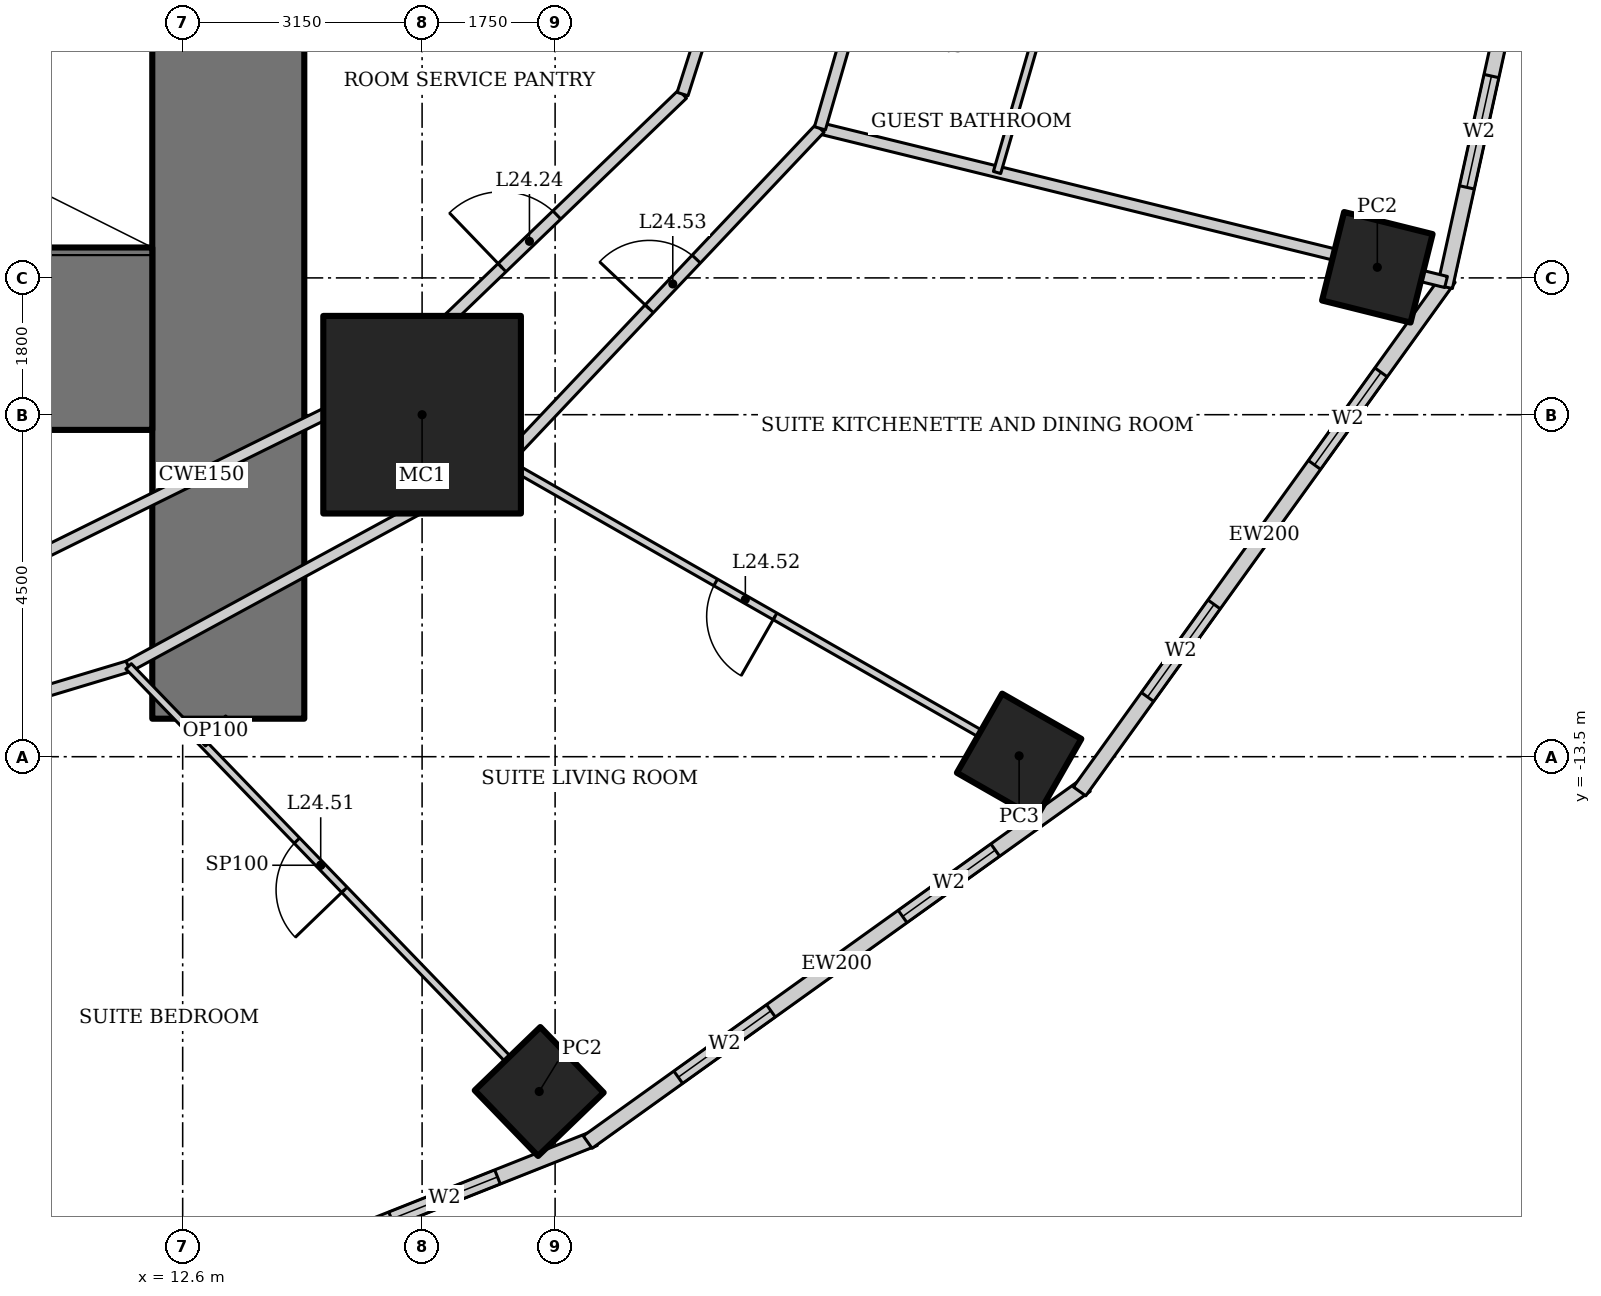
"""IFC4 building model, lengths in metres.
Left out: names, types, materials, properties, quantities, classifications, styles, units other than length and angle.
Written with IfcOpenShell. Run it as: python <this file> out.ifc"""

import sys

from ifc_helpers import new_model, si_unit, direction, frame, frame_2d, origin, origin_2d, place, context, subcontext, project, spatial, rectangle, hollow_rectangle, extrude, element, fill, save


model = new_model("IFC4")
c1 = context("Model", 3, precision=1e-05, world=origin(), true_north=direction((0.0, 1.0)))
c2 = subcontext(c1, "Body", "Model", "MODEL_VIEW")
j1 = project(units=[si_unit("LENGTHUNIT", "METRE"), si_unit("PLANEANGLEUNIT", "RADIAN")], contexts=[c1])
p1 = place(None, origin())
s1 = spatial("IfcSite", under=j1, at=p1, CompositionType="ELEMENT")
p2 = place(p1, origin())
s2 = spatial("IfcBuilding", under=s1, at=p2, CompositionType="ELEMENT")
p3 = place(p2, frame((0.0, 0.0, 101.8)))
s3 = spatial("IfcBuildingStorey", under=s2, at=p3, CompositionType="ELEMENT", Elevation=101.8)
p4 = place(p3, frame((15.75, -9.0, 0.0), z_axis=(0.0, 0.0, 1.0), x_axis=(1.0, 0.0, 0.0)))
e1 = element("IfcColumn", 1, at=p4, inside=s3, PredefinedType="COLUMN", context=c2, shape_type="SweptSolid", body=[
    extrude(hollow_rectangle(XDim=2.6, YDim=2.6, WallThickness=0.13, at=origin_2d()), origin(), (0.0, 0.0, 1.0), 3.6),
])
p5 = place(p3, frame((17.291, -17.905, 0.0), z_axis=(0.0, 0.0, 1.0), x_axis=(0.719339800339, 0.694658370459, 0.0)))
e2 = element("IfcColumn", 2, at=p5, inside=s3, PredefinedType="COLUMN", context=c2, shape_type="SweptSolid", body=[
    extrude(hollow_rectangle(XDim=1.2, YDim=1.2, WallThickness=0.1, at=origin_2d()), origin(), (0.0, 0.0, 1.0), 2.28),
])
p6 = place(p3, frame((23.605, -13.489, 0.0), z_axis=(0.0, 0.0, 1.0), x_axis=(0.496139221777, 0.86824298017, 0.0)))
e3 = element("IfcColumn", 3, at=p6, inside=s3, PredefinedType="COLUMN", context=c2, shape_type="SweptSolid", body=[
    extrude(hollow_rectangle(XDim=1.2, YDim=1.2, WallThickness=0.12, at=origin_2d()), origin(), (0.0, 0.0, 1.0), 2.28),
])
p7 = place(p3, frame((28.318, -7.06, 0.0), z_axis=(0.0, 0.0, 1.0), x_axis=(0.2419218956, 0.970295726276, 0.0)))
e4 = element("IfcColumn", 4, at=p7, inside=s3, PredefinedType="COLUMN", context=c2, shape_type="SweptSolid", body=[
    extrude(hollow_rectangle(XDim=1.2, YDim=1.2, WallThickness=0.1, at=origin_2d()), origin(), (0.0, 0.0, 1.0), 2.28),
])
p8 = place(p3, frame((13.2, -13.0, 0.0), z_axis=(0.0, 0.0, 1.0), x_axis=(0.0, 1.0, 0.0)))
e5 = element("IfcWall", 5, at=p8, inside=s3, PredefinedType="SHEAR", context=c2, shape_type="SweptSolid", body=[
    extrude(rectangle(XDim=26.0, YDim=2.0, at=frame_2d((13.0, 0.0))), origin(), (0.0, 0.0, 1.0), 3.6),
])
p9 = place(p8, frame((12.1, 0.0, 0.0)))
e6 = element("IfcOpeningElement", 6, at=p9, cuts=e5, PredefinedType="OPENING", context=c2, shape_type="SweptSolid", body=[
    extrude(rectangle(XDim=1.8, YDim=2.1, at=frame_2d((0.9, 1.05))), frame((0.0, 1.01, 0.0), z_axis=(0.0, -1.0, 0.0), x_axis=(1.0, 0.0, 0.0)), (0.0, 0.0, 1.0), 2.02),
])
p10 = place(p3, frame((-12.2, -8.0, 0.0), z_axis=(0.0, 0.0, 1.0), x_axis=(1.0, 0.0, 0.0)))
e7 = element("IfcWall", 7, at=p10, inside=s3, PredefinedType="SHEAR", context=c2, shape_type="SweptSolid", body=[
    extrude(rectangle(XDim=24.4, YDim=2.4, at=frame_2d((12.2, 0.0))), origin(), (0.0, 0.0, 1.0), 3.6),
])
p11 = place(p3, frame((10.869, -21.363, 0.0), z_axis=(0.0, 0.0, 1.0), x_axis=(0.929358351251, 0.369178892895, 0.0)))
e8 = element("IfcWall", 8, at=p11, inside=s3, PredefinedType="SOLIDWALL", context=c2, shape_type="SweptSolid", body=[
    extrude(rectangle(XDim=7.692, YDim=0.2, at=frame_2d((3.846, 0.0))), origin(), (0.0, 0.0, 1.0), 3.4),
])
p12 = place(p11, frame((1.373, 0.0, 0.5)))
e9 = element("IfcOpeningElement", 9, at=p12, cuts=e8, PredefinedType="OPENING", context=c2, shape_type="SweptSolid", body=[
    extrude(rectangle(XDim=1.5, YDim=2.2, at=frame_2d((0.75, 1.1))), frame((0.0, 0.11, 0.0), z_axis=(0.0, -1.0, 0.0), x_axis=(1.0, 0.0, 0.0)), (0.0, 0.0, 1.0), 0.22),
])
p13 = place(p11, frame((4.819, 0.0, 0.5)))
e10 = element("IfcOpeningElement", 10, at=p13, cuts=e8, PredefinedType="OPENING", context=c2, shape_type="SweptSolid", body=[
    extrude(rectangle(XDim=1.5, YDim=2.2, at=frame_2d((0.75, 1.1))), frame((0.0, 0.11, 0.0), z_axis=(0.0, -1.0, 0.0), x_axis=(1.0, 0.0, 0.0)), (0.0, 0.0, 1.0), 0.22),
])
p14 = place(p3, frame((17.929, -18.572, 0.0), z_axis=(0.0, 0.0, 1.0), x_axis=(0.812791321576, 0.582554948112, 0.0)))
e11 = element("IfcWall", 11, at=p14, inside=s3, PredefinedType="SOLIDWALL", context=c2, shape_type="SweptSolid", body=[
    extrude(rectangle(XDim=8.063, YDim=0.2, at=frame_2d((4.032, 0.0))), origin(), (0.0, 0.0, 1.0), 3.4),
])
p15 = place(p14, frame((1.466, 0.0, 0.5)))
e12 = element("IfcOpeningElement", 12, at=p15, cuts=e11, PredefinedType="OPENING", context=c2, shape_type="SweptSolid", body=[
    extrude(rectangle(XDim=1.5, YDim=2.2, at=frame_2d((0.75, 1.1))), frame((0.0, 0.11, 0.0), z_axis=(0.0, -1.0, 0.0), x_axis=(1.0, 0.0, 0.0)), (0.0, 0.0, 1.0), 0.22),
])
p16 = place(p14, frame((5.097, 0.0, 0.5)))
e13 = element("IfcOpeningElement", 13, at=p16, cuts=e11, PredefinedType="OPENING", context=c2, shape_type="SweptSolid", body=[
    extrude(rectangle(XDim=1.5, YDim=2.2, at=frame_2d((0.75, 1.1))), frame((0.0, 0.11, 0.0), z_axis=(0.0, -1.0, 0.0), x_axis=(1.0, 0.0, 0.0)), (0.0, 0.0, 1.0), 0.22),
])
p17 = place(p3, frame((24.4, -13.957, 0.0), z_axis=(0.0, 0.0, 1.0), x_axis=(0.583937613703, 0.811798536155, 0.0)))
e14 = element("IfcWall", 14, at=p17, inside=s3, PredefinedType="SOLIDWALL", context=c2, shape_type="SweptSolid", body=[
    extrude(rectangle(XDim=8.323, YDim=0.2, at=frame_2d((4.162, 0.0))), origin(), (0.0, 0.0, 1.0), 3.4),
])
p18 = place(p17, frame((1.531, 0.0, 0.5)))
e15 = element("IfcOpeningElement", 15, at=p18, cuts=e14, PredefinedType="OPENING", context=c2, shape_type="SweptSolid", body=[
    extrude(rectangle(XDim=1.5, YDim=2.2, at=frame_2d((0.75, 1.1))), frame((0.0, 0.11, 0.0), z_axis=(0.0, -1.0, 0.0), x_axis=(1.0, 0.0, 0.0)), (0.0, 0.0, 1.0), 0.22),
])
p19 = place(p17, frame((5.292, 0.0, 0.5)))
e16 = element("IfcOpeningElement", 16, at=p19, cuts=e14, PredefinedType="OPENING", context=c2, shape_type="SweptSolid", body=[
    extrude(rectangle(XDim=1.5, YDim=2.2, at=frame_2d((0.75, 1.1))), frame((0.0, 0.11, 0.0), z_axis=(0.0, -1.0, 0.0), x_axis=(1.0, 0.0, 0.0)), (0.0, 0.0, 1.0), 0.22),
])
p20 = place(p3, frame((29.208, -7.318, 0.0), z_axis=(0.0, 0.0, 1.0), x_axis=(0.215238065514, 0.976561608478, 0.0)))
e17 = element("IfcWall", 17, at=p20, inside=s3, PredefinedType="SOLIDWALL", context=c2, shape_type="SweptSolid", body=[
    extrude(rectangle(XDim=7.562, YDim=0.2, at=frame_2d((3.781, 0.0))), origin(), (0.0, 0.0, 1.0), 3.4),
])
p21 = place(p20, frame((1.341, 0.0, 0.5)))
e18 = element("IfcOpeningElement", 18, at=p21, cuts=e17, PredefinedType="OPENING", context=c2, shape_type="SweptSolid", body=[
    extrude(rectangle(XDim=1.5, YDim=2.2, at=frame_2d((0.75, 1.1))), frame((0.0, 0.11, 0.0), z_axis=(0.0, -1.0, 0.0), x_axis=(1.0, 0.0, 0.0)), (0.0, 0.0, 1.0), 0.22),
])
p22 = place(p20, frame((4.722, 0.0, 0.5)))
e19 = element("IfcOpeningElement", 19, at=p22, cuts=e17, PredefinedType="OPENING", context=c2, shape_type="SweptSolid", body=[
    extrude(rectangle(XDim=1.5, YDim=2.2, at=frame_2d((0.75, 1.1))), frame((0.0, 0.11, 0.0), z_axis=(0.0, -1.0, 0.0), x_axis=(1.0, 0.0, 0.0)), (0.0, 0.0, 1.0), 0.22),
])
p23 = place(p3, frame((10.912, -21.346, 0.0), z_axis=(0.0, 0.0, 1.0), x_axis=(-0.457327273085, 0.889298468059, 0.0)))
e20 = element("IfcWall", 20, at=p23, inside=s3, PredefinedType="PARTITIONING", context=c2, shape_type="SweptSolid", body=[
    extrude(rectangle(XDim=8.511, YDim=0.15, at=frame_2d((4.256, 0.0))), origin(), (0.0, 0.0, 1.0), 2.463),
])
p24 = place(p3, frame((29.222, -7.254, 0.0), z_axis=(0.0, 0.0, 1.0), x_axis=(-0.971178166182, 0.238354713676, 0.0)))
e21 = element("IfcWall", 21, at=p24, inside=s3, PredefinedType="PARTITIONING", context=c2, shape_type="SweptSolid", body=[
    extrude(rectangle(XDim=8.482, YDim=0.15, at=frame_2d((4.241, 0.0))), origin(), (0.0, 0.0, 1.0), 1.9),
])
p25 = place(p3, frame((7.019, -13.776, 0.0), z_axis=(0.0, 0.0, 1.0), x_axis=(0.957564241242, 0.288219922793, 0.0)))
e22 = element("IfcWall", 22, at=p25, inside=s3, PredefinedType="PARTITIONING", context=c2, shape_type="SweptSolid", body=[
    extrude(rectangle(XDim=5.085, YDim=0.15, at=frame_2d((2.542, 0.0))), origin(), (0.0, 0.0, 1.0), 3.4),
])
p26 = place(p3, frame((11.888, -12.311, 0.0), z_axis=(0.0, 0.0, 1.0), x_axis=(0.878450059298, 0.477834169267, 0.0)))
e23 = element("IfcWall", 23, at=p26, inside=s3, PredefinedType="PARTITIONING", context=c2, shape_type="SweptSolid", body=[
    extrude(rectangle(XDim=5.631, YDim=0.15, at=frame_2d((2.815, 0.0))), origin(), (0.0, 0.0, 1.0), 3.4),
])
p27 = place(p3, frame((16.835, -9.62, 0.0), z_axis=(0.0, 0.0, 1.0), x_axis=(0.687062608696, 0.726598218916, 0.0)))
e24 = element("IfcWall", 24, at=p27, inside=s3, PredefinedType="PARTITIONING", context=c2, shape_type="SweptSolid", body=[
    extrude(rectangle(XDim=6.039, YDim=0.15, at=frame_2d((3.02, 0.0))), origin(), (0.0, 0.0, 1.0), 3.4),
])
p28 = place(p27, frame((2.771, 0.0, 0.0)))
e25 = element("IfcOpeningElement", 25, at=p28, cuts=e24, PredefinedType="OPENING", context=c2, shape_type="SweptSolid", body=[
    extrude(rectangle(XDim=0.9, YDim=2.1, at=frame_2d((0.45, 1.05))), frame((0.0, 0.085, 0.0), z_axis=(0.0, -1.0, 0.0), x_axis=(1.0, 0.0, 0.0)), (0.0, 0.0, 1.0), 0.17),
])
p29 = place(p3, frame((20.984, -5.232, 0.0), z_axis=(0.0, 0.0, 1.0), x_axis=(0.278247435376, 0.960509429785, 0.0)))
e26 = element("IfcWall", 26, at=p29, inside=s3, PredefinedType="PARTITIONING", context=c2, shape_type="SweptSolid", body=[
    extrude(rectangle(XDim=5.447, YDim=0.15, at=frame_2d((2.724, 0.0))), origin(), (0.0, 0.0, 1.0), 3.4),
])
p30 = place(p29, frame((4.397, 0.0, 0.0)))
e27 = element("IfcOpeningElement", 27, at=p30, cuts=e26, PredefinedType="OPENING", context=c2, shape_type="SweptSolid", body=[
    extrude(rectangle(XDim=0.9, YDim=2.1, at=frame_2d((0.45, 1.05))), frame((0.0, 0.085, 0.0), z_axis=(0.0, -1.0, 0.0), x_axis=(1.0, 0.0, 0.0)), (0.0, 0.0, 1.0), 0.17),
])
p31 = place(p3, frame((10.551, -10.926, 0.0), z_axis=(0.0, 0.0, 1.0), x_axis=(0.89656943448, 0.442903205177, 0.0)))
e28 = element("IfcWall", 28, at=p31, inside=s3, PredefinedType="PARTITIONING", context=c2, shape_type="SweptSolid", body=[
    extrude(rectangle(XDim=5.126, YDim=0.15, at=frame_2d((2.563, 0.0))), origin(), (0.0, 0.0, 1.0), 3.4),
])
p32 = place(p3, frame((15.147, -8.656, 0.0), z_axis=(0.0, 0.0, 1.0), x_axis=(0.720837261072, 0.693104352209, 0.0)))
e29 = element("IfcWall", 29, at=p32, inside=s3, PredefinedType="PARTITIONING", context=c2, shape_type="SweptSolid", body=[
    extrude(rectangle(XDim=5.59, YDim=0.15, at=frame_2d((2.795, 0.0))), origin(), (0.0, 0.0, 1.0), 3.4),
])
p33 = place(p32, frame((2.295, 0.0, 0.0)))
e30 = element("IfcOpeningElement", 30, at=p33, cuts=e29, PredefinedType="OPENING", context=c2, shape_type="SweptSolid", body=[
    extrude(rectangle(XDim=1.0, YDim=2.1, at=frame_2d((0.5, 1.05))), frame((0.0, 0.085, 0.0), z_axis=(0.0, -1.0, 0.0), x_axis=(1.0, 0.0, 0.0)), (0.0, 0.0, 1.0), 0.17),
])
p34 = place(p3, frame((19.177, -4.781, 0.0), z_axis=(0.0, 0.0, 1.0), x_axis=(0.303505448228, 0.952829702988, 0.0)))
e31 = element("IfcWall", 31, at=p34, inside=s3, PredefinedType="PARTITIONING", context=c2, shape_type="SweptSolid", body=[
    extrude(rectangle(XDim=4.073, YDim=0.15, at=frame_2d((2.037, 0.0))), origin(), (0.0, 0.0, 1.0), 3.4),
])
p35 = place(p3, frame((16.944, -17.545, 0.0), z_axis=(0.0, 0.0, 1.0), x_axis=(-0.694669949151, 0.719328618746, 0.0)))
e32 = element("IfcWall", 32, at=p35, inside=s3, PredefinedType="PARTITIONING", context=c2, shape_type="SweptSolid", body=[
    extrude(rectangle(XDim=7.277, YDim=0.1, at=frame_2d((3.639, 0.0))), origin(), (0.0, 0.0, 1.0), 2.463),
])
p36 = place(p35, frame((3.189, 0.0, 0.0)))
e33 = element("IfcOpeningElement", 33, at=p36, cuts=e32, PredefinedType="OPENING", context=c2, shape_type="SweptSolid", body=[
    extrude(rectangle(XDim=0.9, YDim=2.1, at=frame_2d((0.45, 1.05))), frame((0.0, 0.06, 0.0), z_axis=(0.0, -1.0, 0.0), x_axis=(1.0, 0.0, 0.0)), (0.0, 0.0, 1.0), 0.12),
])
p37 = place(p3, frame((23.171, -13.24, 0.0), z_axis=(0.0, 0.0, 1.0), x_axis=(-0.868253436131, 0.496120923412, 0.0)))
e34 = element("IfcWall", 34, at=p37, inside=s3, PredefinedType="PARTITIONING", context=c2, shape_type="SweptSolid", body=[
    extrude(rectangle(XDim=7.297, YDim=0.1, at=frame_2d((3.649, 0.0))), origin(), (0.0, 0.0, 1.0), 2.2),
])
p38 = place(p37, frame((3.198, 0.0, 0.0)))
e35 = element("IfcOpeningElement", 35, at=p38, cuts=e34, PredefinedType="OPENING", context=c2, shape_type="SweptSolid", body=[
    extrude(rectangle(XDim=0.9, YDim=2.1, at=frame_2d((0.45, 1.05))), frame((0.0, 0.06, 0.0), z_axis=(0.0, -1.0, 0.0), x_axis=(1.0, 0.0, 0.0)), (0.0, 0.0, 1.0), 0.12),
])
p39 = place(p3, frame((23.846, -3.979, 0.0), z_axis=(0.0, 0.0, 1.0), x_axis=(-0.278197767203, -0.960523816635, 0.0)))
e36 = element("IfcWall", 36, at=p39, inside=s3, PredefinedType="PARTITIONING", context=c2, shape_type="SweptSolid", body=[
    extrude(rectangle(XDim=1.91, YDim=0.1, at=frame_2d((0.955, 0.0))), origin(), (0.0, 0.0, 1.0), 3.4),
])
p40 = place(p3, frame((13.2, -13.0, 0.0), z_axis=(0.0, 0.0, 1.0), x_axis=(-0.719347134512, -0.69465077562, 0.0)))
e37 = element("IfcWall", 37, at=p40, inside=s3, PredefinedType="PARTITIONING", context=c2, shape_type="SweptSolid", body=[
    extrude(rectangle(XDim=0.465, YDim=0.1, at=frame_2d((0.232, 0.0))), origin(), (0.0, 0.0, 1.0), 3.4),
])
p41 = place(p13, origin())
e38 = element("IfcWindow", 38, at=p41, inside=s3, PartitioningType="SINGLE_PANEL", PredefinedType="WINDOW", context=c2, shape_type="SweptSolid", body=[
    extrude(rectangle(XDim=1.5, YDim=2.2, at=frame_2d((0.75, 1.1))), frame((0.0, 0.03, 0.0), z_axis=(0.0, -1.0, 0.0), x_axis=(1.0, 0.0, 0.0)), (0.0, 0.0, 1.0), 0.06),
])
fill(e10, e38)
p42 = place(p15, origin())
e39 = element("IfcWindow", 39, at=p42, inside=s3, PartitioningType="SINGLE_PANEL", PredefinedType="WINDOW", context=c2, shape_type="SweptSolid", body=[
    extrude(rectangle(XDim=1.5, YDim=2.2, at=frame_2d((0.75, 1.1))), frame((0.0, 0.03, 0.0), z_axis=(0.0, -1.0, 0.0), x_axis=(1.0, 0.0, 0.0)), (0.0, 0.0, 1.0), 0.06),
])
fill(e12, e39)
p43 = place(p16, origin())
e40 = element("IfcWindow", 40, at=p43, inside=s3, PartitioningType="SINGLE_PANEL", PredefinedType="WINDOW", context=c2, shape_type="SweptSolid", body=[
    extrude(rectangle(XDim=1.5, YDim=2.2, at=frame_2d((0.75, 1.1))), frame((0.0, 0.03, 0.0), z_axis=(0.0, -1.0, 0.0), x_axis=(1.0, 0.0, 0.0)), (0.0, 0.0, 1.0), 0.06),
])
fill(e13, e40)
p44 = place(p18, origin())
e41 = element("IfcWindow", 41, at=p44, inside=s3, PartitioningType="SINGLE_PANEL", PredefinedType="WINDOW", context=c2, shape_type="SweptSolid", body=[
    extrude(rectangle(XDim=1.5, YDim=2.2, at=frame_2d((0.75, 1.1))), frame((0.0, 0.03, 0.0), z_axis=(0.0, -1.0, 0.0), x_axis=(1.0, 0.0, 0.0)), (0.0, 0.0, 1.0), 0.06),
])
fill(e15, e41)
p45 = place(p19, origin())
e42 = element("IfcWindow", 42, at=p45, inside=s3, PartitioningType="SINGLE_PANEL", PredefinedType="WINDOW", context=c2, shape_type="SweptSolid", body=[
    extrude(rectangle(XDim=1.5, YDim=2.2, at=frame_2d((0.75, 1.1))), frame((0.0, 0.03, 0.0), z_axis=(0.0, -1.0, 0.0), x_axis=(1.0, 0.0, 0.0)), (0.0, 0.0, 1.0), 0.06),
])
fill(e16, e42)
p46 = place(p21, origin())
e43 = element("IfcWindow", 43, at=p46, inside=s3, PartitioningType="SINGLE_PANEL", PredefinedType="WINDOW", context=c2, shape_type="SweptSolid", body=[
    extrude(rectangle(XDim=1.5, YDim=2.2, at=frame_2d((0.75, 1.1))), frame((0.0, 0.03, 0.0), z_axis=(0.0, -1.0, 0.0), x_axis=(1.0, 0.0, 0.0)), (0.0, 0.0, 1.0), 0.06),
])
fill(e18, e43)
p47 = place(p33, origin())
e44 = element("IfcDoor", 44, at=p47, inside=s3, OperationType="SINGLE_SWING_LEFT", PredefinedType="DOOR", context=c2, shape_type="SweptSolid", body=[
    extrude(rectangle(XDim=1.0, YDim=2.1, at=frame_2d((0.5, 1.05))), frame((0.0, 0.025, 0.0), z_axis=(0.0, -1.0, 0.0), x_axis=(1.0, 0.0, 0.0)), (0.0, 0.0, 1.0), 0.05),
])
fill(e30, e44)
p48 = place(p36, origin())
e45 = element("IfcDoor", 45, at=p48, inside=s3, OperationType="SINGLE_SWING_LEFT", PredefinedType="DOOR", context=c2, shape_type="SweptSolid", body=[
    extrude(rectangle(XDim=0.9, YDim=2.1, at=frame_2d((0.45, 1.05))), frame((0.0, 0.025, 0.0), z_axis=(0.0, -1.0, 0.0), x_axis=(1.0, 0.0, 0.0)), (0.0, 0.0, 1.0), 0.05),
])
fill(e33, e45)
p49 = place(p38, origin())
e46 = element("IfcDoor", 46, at=p49, inside=s3, OperationType="SINGLE_SWING_LEFT", PredefinedType="DOOR", context=c2, shape_type="SweptSolid", body=[
    extrude(rectangle(XDim=0.9, YDim=2.1, at=frame_2d((0.45, 1.05))), frame((0.0, 0.025, 0.0), z_axis=(0.0, -1.0, 0.0), x_axis=(1.0, 0.0, 0.0)), (0.0, 0.0, 1.0), 0.05),
])
fill(e35, e46)
p50 = place(p28, origin())
e47 = element("IfcDoor", 47, at=p50, inside=s3, OperationType="SINGLE_SWING_LEFT", PredefinedType="DOOR", context=c2, shape_type="SweptSolid", body=[
    extrude(rectangle(XDim=0.9, YDim=2.1, at=frame_2d((0.45, 1.05))), frame((0.0, 0.025, 0.0), z_axis=(0.0, -1.0, 0.0), x_axis=(1.0, 0.0, 0.0)), (0.0, 0.0, 1.0), 0.05),
])
fill(e25, e47)
save(model, sys.argv[1])
